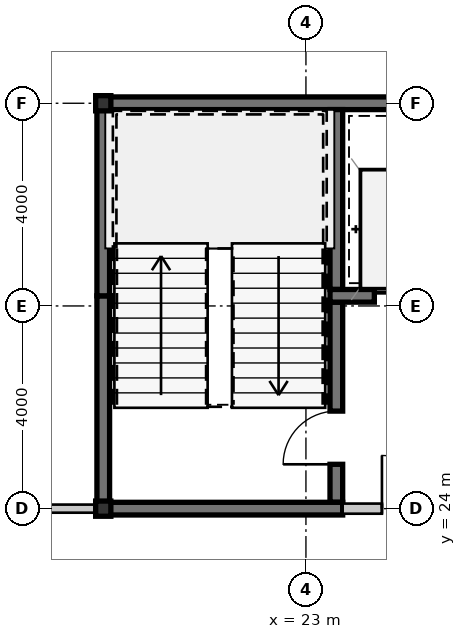
"""IFC4 building model, lengths in metres.
Left out: names, types, materials, properties, quantities, classifications, styles, units other than length and angle.
Written with IfcOpenShell. Run it as: python <this file> out.ifc"""

import sys

from ifc_helpers import new_model, si_unit, direction, frame, frame_2d, origin, origin_2d, place, context, subcontext, project, spatial, rectangle, hollow_rectangle, extrude, source, transform, mapped, element, fill, save


model = new_model("IFC4")
c1 = context("Model", 3, precision=1e-05, world=origin(), true_north=direction((0.0, 1.0)))
c2 = subcontext(c1, "Body", "Model", "MODEL_VIEW")
j1 = project(units=[si_unit("LENGTHUNIT", "METRE"), si_unit("PLANEANGLEUNIT", "RADIAN")], contexts=[c1])
p1 = place(None, origin())
s1 = spatial("IfcSite", under=j1, at=p1, CompositionType="ELEMENT")
p2 = place(p1, origin())
s2 = spatial("IfcBuilding", under=s1, at=p2, CompositionType="ELEMENT")
p3 = place(p2, frame((0.0, 0.0, 211.4)))
s3 = spatial("IfcBuildingStorey", under=s2, at=p3, CompositionType="ELEMENT", Elevation=211.4)
m1 = source(origin(), c2, "Body", "SweptSolid", [
    extrude(hollow_rectangle(XDim=0.3, YDim=0.3, WallThickness=0.012, at=origin_2d()), origin(), (0.0, 0.0, 1.0), 3.15),
])
for number, where, z_axis, x_axis in (
    (1, (19.0, 24.0, 0.0), (0.0, 0.0, 1.0), (1.0, 0.0, 0.0)),
    (2, (19.0, 32.0, 0.0), (0.0, 0.0, 1.0), (1.0, 0.0, 0.0)),
):
    element("IfcColumn", number, at=place(p3, frame(where, z_axis=z_axis, x_axis=x_axis)), inside=s3, PredefinedType="COLUMN", context=c2, shape_type="MappedRepresentation", body=[
        mapped(m1, transform((0.0, 0.0, 0.0), scale=1.0)),
    ])
m2 = source(origin(), c2, "Body", "SweptSolid", [
    extrude(rectangle(XDim=9.125, YDim=0.25, at=frame_2d((4.562, 0.0))), origin(), (0.0, 0.0, 1.0), 2.93),
])
p4 = place(p3, frame((18.875, 32.0, 0.0), z_axis=(0.0, 0.0, 1.0), x_axis=(1.0, 0.0, 0.0)))
e3 = element("IfcWall", 3, at=p4, inside=s3, PredefinedType="SHEAR", context=c2, shape_type="MappedRepresentation", body=[
    mapped(m2, transform((0.0, 0.0, 0.0), scale=1.0)),
])
m3 = source(origin(), c2, "Body", "SweptSolid", [
    extrude(rectangle(XDim=4.075, YDim=0.25, at=frame_2d((2.038, 0.0))), origin(), (0.0, 0.0, 1.0), 2.93),
])
p5 = place(p3, frame((19.0, 24.125, 0.0), z_axis=(0.0, 0.0, 1.0), x_axis=(0.0, 1.0, 0.0)))
e4 = element("IfcWall", 4, at=p5, inside=s3, PredefinedType="SHEAR", context=c2, shape_type="MappedRepresentation", body=[
    mapped(m3, transform((0.0, 0.0, 0.0), scale=1.0)),
])
m4 = source(origin(), c2, "Body", "SweptSolid", [
    extrude(rectangle(XDim=3.675, YDim=0.25, at=frame_2d((1.837, 0.0))), origin(), (0.0, 0.0, 1.0), 2.93),
])
p6 = place(p3, frame((19.0, 28.2, 0.0), z_axis=(0.0, 0.0, 1.0), x_axis=(0.0, 1.0, 0.0)))
e5 = element("IfcWall", 5, at=p6, inside=s3, PredefinedType="SHEAR", context=c2, shape_type="MappedRepresentation", body=[
    mapped(m4, transform((0.0, 0.0, 0.0), scale=1.0)),
])
m5 = source(origin(), c2, "Body", "SweptSolid", [
    extrude(rectangle(XDim=3.55, YDim=0.25, at=frame_2d((1.775, 0.0))), origin(), (0.0, 0.0, 1.0), 2.93),
])
p7 = place(p3, frame((23.6, 28.325, 0.0), z_axis=(0.0, 0.0, 1.0), x_axis=(0.0, 1.0, 0.0)))
e6 = element("IfcWall", 6, at=p7, inside=s3, PredefinedType="SHEAR", context=c2, shape_type="MappedRepresentation", body=[
    mapped(m5, transform((0.0, 0.0, 0.0), scale=1.0)),
])
m6 = source(origin(), c2, "Body", "SweptSolid", [
    extrude(rectangle(XDim=3.95, YDim=0.25, at=frame_2d((1.975, 0.0))), origin(), (0.0, 0.0, 1.0), 2.93),
])
p8 = place(p3, frame((23.6, 24.125, 0.0), z_axis=(0.0, 0.0, 1.0), x_axis=(0.0, 1.0, 0.0)))
e7 = element("IfcWall", 7, at=p8, inside=s3, PredefinedType="SHEAR", context=c2, shape_type="MappedRepresentation", body=[
    mapped(m6, transform((0.0, 0.0, 0.0), scale=1.0)),
])
m7 = source(origin(), c2, "Body", "SweptSolid", [
    extrude(rectangle(XDim=1.05, YDim=2.1, at=frame_2d((0.525, 1.05))), frame((0.0, 0.135, 0.0), z_axis=(0.0, -1.0, 0.0), x_axis=(1.0, 0.0, 0.0)), (0.0, 0.0, 1.0), 0.27),
])
p9 = place(p8, frame((0.75, 0.0, 0.0)))
e8 = element("IfcOpeningElement", 8, at=p9, cuts=e7, PredefinedType="OPENING", context=c2, shape_type="MappedRepresentation", body=[
    mapped(m7, transform((0.0, 0.0, 0.0), scale=1.0)),
])
m8 = source(origin(), c2, "Body", "SweptSolid", [
    extrude(rectangle(XDim=4.85, YDim=0.25, at=frame_2d((2.425, 0.0))), origin(), (0.0, 0.0, 1.0), 2.93),
])
p10 = place(p3, frame((18.875, 24.0, 0.0), z_axis=(0.0, 0.0, 1.0), x_axis=(1.0, 0.0, 0.0)))
e9 = element("IfcWall", 9, at=p10, inside=s3, PredefinedType="SHEAR", context=c2, shape_type="MappedRepresentation", body=[
    mapped(m8, transform((0.0, 0.0, 0.0), scale=1.0)),
])
m9 = source(origin(), c2, "Body", "SweptSolid", [
    extrude(rectangle(XDim=2.85, YDim=0.25, at=frame_2d((1.425, 0.0))), origin(), (0.0, 0.0, 1.0), 2.93),
])
p11 = place(p3, frame((23.475, 28.2, 0.0), z_axis=(0.0, 0.0, 1.0), x_axis=(1.0, 0.0, 0.0)))
e10 = element("IfcWall", 10, at=p11, inside=s3, PredefinedType="SHEAR", context=c2, shape_type="MappedRepresentation", body=[
    mapped(m9, transform((0.0, 0.0, 0.0), scale=1.0)),
])
m10 = source(origin(), c2, "Body", "SweptSolid", [
    extrude(rectangle(XDim=1.1, YDim=2.15, at=frame_2d((0.55, 1.075))), frame((0.0, 0.135, 0.0), z_axis=(0.0, -1.0, 0.0), x_axis=(1.0, 0.0, 0.0)), (0.0, 0.0, 1.0), 0.27),
])
p12 = place(p11, frame((0.875, 0.0, 0.0)))
e11 = element("IfcOpeningElement", 11, at=p12, cuts=e10, PredefinedType="OPENING", context=c2, shape_type="MappedRepresentation", body=[
    mapped(m10, transform((0.0, 0.0, 0.0), scale=1.0)),
])
m11 = source(origin(), c2, "Body", "SweptSolid", [
    extrude(rectangle(XDim=2.725, YDim=0.2, at=frame_2d((1.362, 0.0))), origin(), (0.0, 0.0, 1.0), 2.47),
])
p13 = place(p3, frame((23.725, 24.0, 0.0), z_axis=(0.0, 0.0, 1.0), x_axis=(1.0, 0.0, 0.0)))
e12 = element("IfcWall", 12, at=p13, inside=s3, PredefinedType="SOLIDWALL", context=c2, shape_type="MappedRepresentation", body=[
    mapped(m11, transform((0.0, 0.0, 0.0), scale=1.0)),
])
m12 = source(origin(), c2, "Body", "SweptSolid", [
    extrude(rectangle(XDim=1.05, YDim=2.1, at=frame_2d((0.525, 1.05))), frame((0.0, 0.11, 0.0), z_axis=(0.0, -1.0, 0.0), x_axis=(1.0, 0.0, 0.0)), (0.0, 0.0, 1.0), 0.22),
])
p14 = place(p13, frame((0.775, 0.0, 0.0)))
e13 = element("IfcOpeningElement", 13, at=p14, cuts=e12, PredefinedType="OPENING", context=c2, shape_type="MappedRepresentation", body=[
    mapped(m12, transform((0.0, 0.0, 0.0), scale=1.0)),
])
m13 = source(origin(), c2, "Body", "SweptSolid", [
    extrude(rectangle(XDim=6.032, YDim=0.16, at=frame_2d((3.016, 0.0))), origin(), (0.0, 0.0, 1.0), 2.93),
])
p15 = place(p3, frame((12.843, 24.0, 0.0), z_axis=(0.0, 0.0, 1.0), x_axis=(1.0, 0.0, 0.0)))
e14 = element("IfcWall", 14, at=p15, inside=s3, PredefinedType="PARTITIONING", context=c2, shape_type="MappedRepresentation", body=[
    mapped(m13, transform((0.0, 0.0, 0.0), scale=1.0)),
])
m14 = source(origin(), c2, "Body", "SweptSolid", [
    extrude(rectangle(XDim=1.05, YDim=2.1, at=frame_2d((0.525, 1.05))), frame((0.0, 0.025, 0.0), z_axis=(0.0, -1.0, 0.0), x_axis=(1.0, 0.0, 0.0)), (0.0, 0.0, 1.0), 0.05),
])
p16 = place(p9, origin())
e15 = element("IfcDoor", 15, at=p16, inside=s3, OperationType="SINGLE_SWING_LEFT", PredefinedType="DOOR", context=c2, shape_type="MappedRepresentation", body=[
    mapped(m14, transform((0.0, 0.0, 0.0), scale=1.0)),
])
fill(e8, e15)
m15 = source(origin(), c2, "Body", "SweptSolid", [
    extrude(rectangle(XDim=1.1, YDim=2.15, at=frame_2d((0.55, 1.075))), frame((0.0, 0.025, 0.0), z_axis=(0.0, -1.0, 0.0), x_axis=(1.0, 0.0, 0.0)), (0.0, 0.0, 1.0), 0.05),
])
p17 = place(p12, origin())
e16 = element("IfcDoor", 16, at=p17, inside=s3, OperationType="SLIDING_TO_LEFT", PredefinedType="DOOR", context=c2, shape_type="MappedRepresentation", body=[
    mapped(m15, transform((0.0, 0.0, 0.0), scale=1.0)),
])
fill(e11, e16)
p18 = place(p14, origin())
e17 = element("IfcDoor", 17, at=p18, inside=s3, OperationType="SINGLE_SWING_LEFT", PredefinedType="DOOR", context=c2, shape_type="MappedRepresentation", body=[
    mapped(m14, transform((0.0, 0.0, 0.0), scale=1.0)),
])
fill(e13, e17)
save(model, sys.argv[1])
